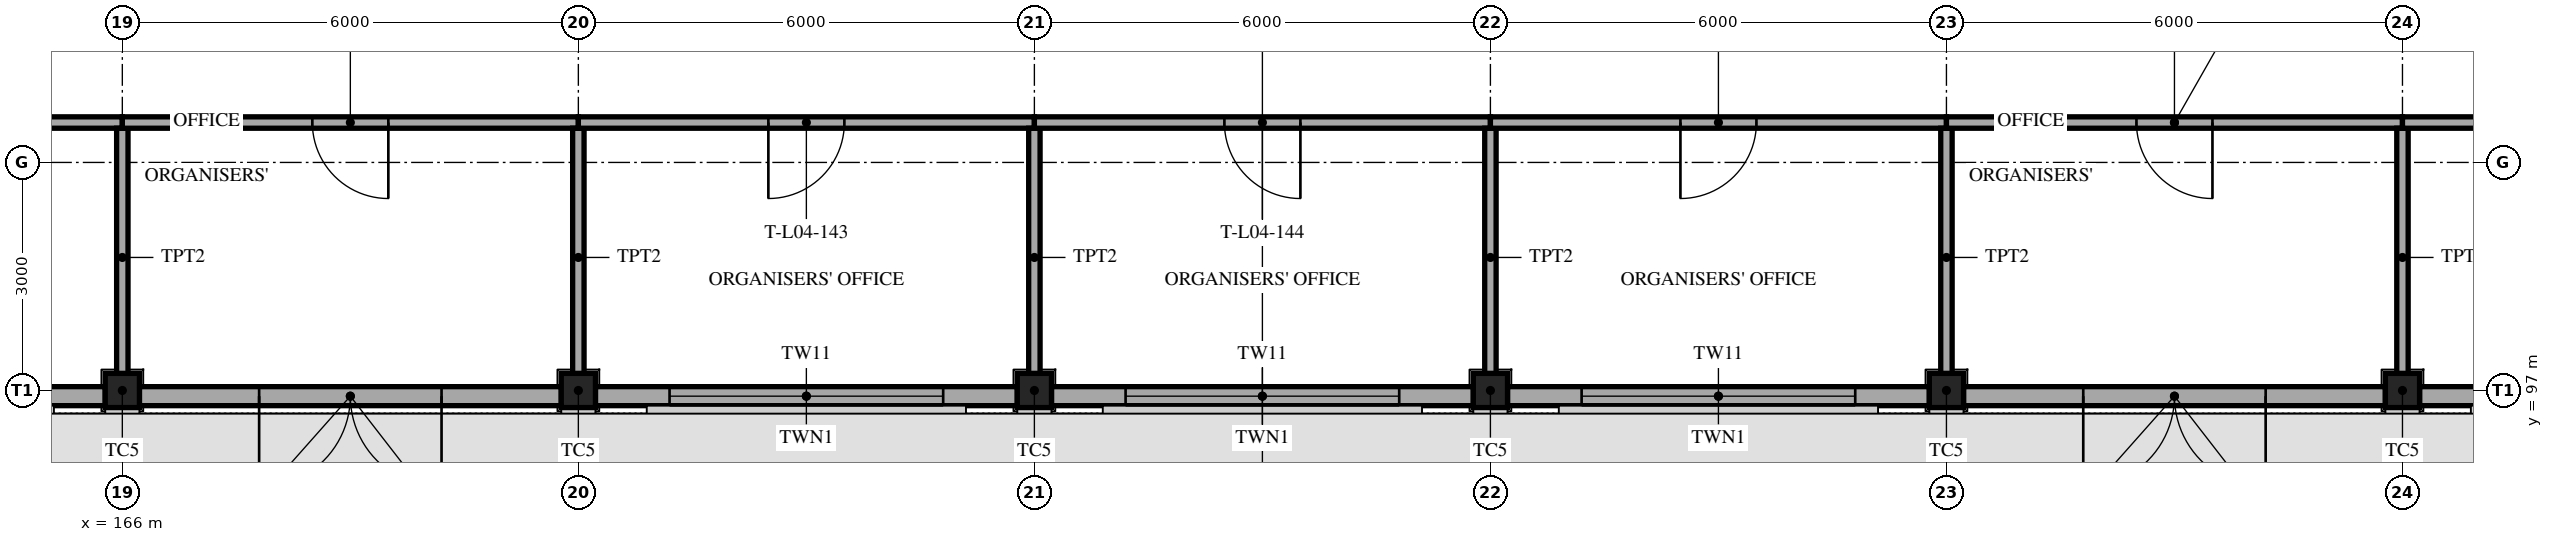
"""IFC4 building model, lengths in metres.
Left out: names, types, materials, properties, quantities, classifications, styles, units other than length and angle.
Written with IfcOpenShell. Run it as: python <this file> out.ifc"""

import sys

from ifc_helpers import new_model, si_unit, direction, frame, frame_2d, origin, origin_2d, place, context, subcontext, project, spatial, polyline, rectangle, hollow_rectangle, outline, extrude, element, fill, save


model = new_model("IFC4")
c1 = context("Model", 3, precision=1e-05, world=origin(), true_north=direction((0.0, 1.0)))
c2 = subcontext(c1, "Body", "Model", "MODEL_VIEW")
j1 = project(units=[si_unit("LENGTHUNIT", "METRE"), si_unit("PLANEANGLEUNIT", "RADIAN")], contexts=[c1])
p1 = place(None, origin())
s1 = spatial("IfcSite", under=j1, at=p1, CompositionType="ELEMENT")
p2 = place(p1, origin())
s2 = spatial("IfcBuilding", under=s1, at=p2, CompositionType="ELEMENT")
p3 = place(p2, frame((0.0, 0.0, 19.2)))
s3 = spatial("IfcBuildingStorey", under=s2, at=p3, CompositionType="ELEMENT", Elevation=19.2)
for number, where, z_axis, x_axis in (
    (1, (166.0, 97.0, 0.0), (0.0, 0.0, 1.0), (1.0, 0.0, 0.0)),
    (2, (172.0, 97.0, 0.0), (0.0, 0.0, 1.0), (1.0, 0.0, 0.0)),
    (3, (178.0, 97.0, 0.0), (0.0, 0.0, 1.0), (1.0, 0.0, 0.0)),
    (4, (184.0, 97.0, 0.0), (0.0, 0.0, 1.0), (1.0, 0.0, 0.0)),
    (5, (190.0, 97.0, 0.0), (0.0, 0.0, 1.0), (1.0, 0.0, 0.0)),
    (6, (196.0, 97.0, 0.0), (0.0, 0.0, 1.0), (1.0, 0.0, 0.0)),
):
    element("IfcColumn", number, at=place(p3, frame(where, z_axis=z_axis, x_axis=x_axis)), inside=s3, PredefinedType="COLUMN", context=c2, shape_type="SweptSolid", body=[
        extrude(hollow_rectangle(XDim=0.45, YDim=0.45, WallThickness=0.025, at=origin_2d()), origin(), (0.0, 0.0, 1.0), 4.2),
    ])
p4 = place(p3, frame((160.225, 96.925, 0.0), z_axis=(0.0, 0.0, 1.0), x_axis=(1.0, 0.0, 0.0)))
e7 = element("IfcWall", 7, at=p4, inside=s3, PredefinedType="SOLIDWALL", context=c2, shape_type="SweptSolid", body=[
    extrude(rectangle(XDim=5.55, YDim=0.25, at=frame_2d((2.775, 0.0))), origin(), (0.0, 0.0, 1.0), 3.55),
])
p5 = place(p4, frame((0.975, 0.0, 0.9)))
e8 = element("IfcOpeningElement", 8, at=p5, cuts=e7, PredefinedType="OPENING", context=c2, shape_type="SweptSolid", body=[
    extrude(rectangle(XDim=3.6, YDim=2.4, at=frame_2d((1.8, 1.2))), frame((0.0, 0.135, 0.0), z_axis=(0.0, -1.0, 0.0), x_axis=(1.0, 0.0, 0.0)), (0.0, 0.0, 1.0), 0.27),
])
p6 = place(p3, frame((172.225, 96.925, 0.0), z_axis=(0.0, 0.0, 1.0), x_axis=(1.0, 0.0, 0.0)))
e9 = element("IfcWall", 9, at=p6, inside=s3, PredefinedType="SOLIDWALL", context=c2, shape_type="SweptSolid", body=[
    extrude(rectangle(XDim=5.55, YDim=0.25, at=frame_2d((2.775, 0.0))), origin(), (0.0, 0.0, 1.0), 3.55),
])
p7 = place(p6, frame((0.975, 0.0, 0.9)))
e10 = element("IfcOpeningElement", 10, at=p7, cuts=e9, PredefinedType="OPENING", context=c2, shape_type="SweptSolid", body=[
    extrude(rectangle(XDim=3.6, YDim=2.4, at=frame_2d((1.8, 1.2))), frame((0.0, 0.135, 0.0), z_axis=(0.0, -1.0, 0.0), x_axis=(1.0, 0.0, 0.0)), (0.0, 0.0, 1.0), 0.27),
])
p8 = place(p3, frame((178.225, 96.925, 0.0), z_axis=(0.0, 0.0, 1.0), x_axis=(1.0, 0.0, 0.0)))
e11 = element("IfcWall", 11, at=p8, inside=s3, PredefinedType="SOLIDWALL", context=c2, shape_type="SweptSolid", body=[
    extrude(rectangle(XDim=5.55, YDim=0.25, at=frame_2d((2.775, 0.0))), origin(), (0.0, 0.0, 1.0), 3.55),
])
p9 = place(p8, frame((0.975, 0.0, 0.9)))
e12 = element("IfcOpeningElement", 12, at=p9, cuts=e11, PredefinedType="OPENING", context=c2, shape_type="SweptSolid", body=[
    extrude(rectangle(XDim=3.6, YDim=2.4, at=frame_2d((1.8, 1.2))), frame((0.0, 0.135, 0.0), z_axis=(0.0, -1.0, 0.0), x_axis=(1.0, 0.0, 0.0)), (0.0, 0.0, 1.0), 0.27),
])
p10 = place(p3, frame((184.225, 96.925, 0.0), z_axis=(0.0, 0.0, 1.0), x_axis=(1.0, 0.0, 0.0)))
e13 = element("IfcWall", 13, at=p10, inside=s3, PredefinedType="SOLIDWALL", context=c2, shape_type="SweptSolid", body=[
    extrude(rectangle(XDim=5.55, YDim=0.25, at=frame_2d((2.775, 0.0))), origin(), (0.0, 0.0, 1.0), 3.55),
])
p11 = place(p10, frame((0.975, 0.0, 0.9)))
e14 = element("IfcOpeningElement", 14, at=p11, cuts=e13, PredefinedType="OPENING", context=c2, shape_type="SweptSolid", body=[
    extrude(rectangle(XDim=3.6, YDim=2.4, at=frame_2d((1.8, 1.2))), frame((0.0, 0.135, 0.0), z_axis=(0.0, -1.0, 0.0), x_axis=(1.0, 0.0, 0.0)), (0.0, 0.0, 1.0), 0.27),
])
p12 = place(p3, frame((196.225, 96.925, 0.0), z_axis=(0.0, 0.0, 1.0), x_axis=(1.0, 0.0, 0.0)))
e15 = element("IfcWall", 15, at=p12, inside=s3, PredefinedType="SOLIDWALL", context=c2, shape_type="SweptSolid", body=[
    extrude(rectangle(XDim=5.55, YDim=0.25, at=frame_2d((2.775, 0.0))), origin(), (0.0, 0.0, 1.0), 3.55),
])
p13 = place(p12, frame((0.975, 0.0, 0.9)))
e16 = element("IfcOpeningElement", 16, at=p13, cuts=e15, PredefinedType="OPENING", context=c2, shape_type="SweptSolid", body=[
    extrude(rectangle(XDim=3.6, YDim=2.4, at=frame_2d((1.8, 1.2))), frame((0.0, 0.135, 0.0), z_axis=(0.0, -1.0, 0.0), x_axis=(1.0, 0.0, 0.0)), (0.0, 0.0, 1.0), 0.27),
])
p14 = place(p3, frame((166.225, 96.925, 0.0), z_axis=(0.0, 0.0, 1.0), x_axis=(1.0, 0.0, 0.0)))
e17 = element("IfcWall", 17, at=p14, inside=s3, PredefinedType="SOLIDWALL", context=c2, shape_type="SweptSolid", body=[
    extrude(rectangle(XDim=5.55, YDim=0.25, at=frame_2d((2.775, 0.0))), origin(), (0.0, 0.0, 1.0), 3.55),
])
p15 = place(p14, frame((1.575, 0.0, 0.0)))
e18 = element("IfcOpeningElement", 18, at=p15, cuts=e17, PredefinedType="OPENING", context=c2, shape_type="SweptSolid", body=[
    extrude(rectangle(XDim=2.4, YDim=2.1, at=frame_2d((1.2, 1.05))), frame((0.0, 0.135, 0.0), z_axis=(0.0, -1.0, 0.0), x_axis=(1.0, 0.0, 0.0)), (0.0, 0.0, 1.0), 0.27),
])
p16 = place(p3, frame((190.225, 96.925, 0.0), z_axis=(0.0, 0.0, 1.0), x_axis=(1.0, 0.0, 0.0)))
e19 = element("IfcWall", 19, at=p16, inside=s3, PredefinedType="SOLIDWALL", context=c2, shape_type="SweptSolid", body=[
    extrude(rectangle(XDim=5.55, YDim=0.25, at=frame_2d((2.775, 0.0))), origin(), (0.0, 0.0, 1.0), 3.55),
])
p17 = place(p16, frame((1.575, 0.0, 0.0)))
e20 = element("IfcOpeningElement", 20, at=p17, cuts=e19, PredefinedType="OPENING", context=c2, shape_type="SweptSolid", body=[
    extrude(rectangle(XDim=2.4, YDim=2.1, at=frame_2d((1.2, 1.05))), frame((0.0, 0.135, 0.0), z_axis=(0.0, -1.0, 0.0), x_axis=(1.0, 0.0, 0.0)), (0.0, 0.0, 1.0), 0.27),
])
p18 = place(p3, frame((160.05, 100.525, 0.0), z_axis=(0.0, 0.0, 1.0), x_axis=(1.0, 0.0, 0.0)))
e21 = element("IfcWall", 21, at=p18, inside=s3, PredefinedType="PARTITIONING", context=c2, shape_type="SweptSolid", body=[
    extrude(rectangle(XDim=5.95, YDim=0.15, at=frame_2d((2.975, 0.0))), origin(), (0.0, 0.0, 1.0), 3.45),
])
p19 = place(p18, frame((2.438, 0.0, 0.0)))
e22 = element("IfcOpeningElement", 22, at=p19, cuts=e21, PredefinedType="OPENING", context=c2, shape_type="SweptSolid", body=[
    extrude(rectangle(XDim=1.0, YDim=2.1, at=frame_2d((0.5, 1.05))), frame((0.0, 0.085, 0.0), z_axis=(0.0, -1.0, 0.0), x_axis=(1.0, 0.0, 0.0)), (0.0, 0.0, 1.0), 0.17),
])
p20 = place(p3, frame((166.0, 97.05, 0.0), z_axis=(0.0, 0.0, 1.0), x_axis=(0.0, 1.0, 0.0)))
e23 = element("IfcWall", 23, at=p20, inside=s3, PredefinedType="PARTITIONING", context=c2, shape_type="SweptSolid", body=[
    extrude(rectangle(XDim=3.4, YDim=0.15, at=frame_2d((1.7, 0.0))), origin(), (0.0, 0.0, 1.0), 3.45),
])
p21 = place(p3, frame((166.0, 100.525, 0.0), z_axis=(0.0, 0.0, 1.0), x_axis=(1.0, 0.0, 0.0)))
e24 = element("IfcWall", 24, at=p21, inside=s3, PredefinedType="PARTITIONING", context=c2, shape_type="SweptSolid", body=[
    extrude(rectangle(XDim=6.0, YDim=0.15, at=frame_2d((3.0, 0.0))), origin(), (0.0, 0.0, 1.0), 3.45),
])
p22 = place(p21, frame((2.5, 0.0, 0.0)))
e25 = element("IfcOpeningElement", 25, at=p22, cuts=e24, PredefinedType="OPENING", context=c2, shape_type="SweptSolid", body=[
    extrude(rectangle(XDim=1.0, YDim=2.1, at=frame_2d((0.5, 1.05))), frame((0.0, 0.085, 0.0), z_axis=(0.0, -1.0, 0.0), x_axis=(1.0, 0.0, 0.0)), (0.0, 0.0, 1.0), 0.17),
])
p23 = place(p3, frame((172.0, 97.05, 0.0), z_axis=(0.0, 0.0, 1.0), x_axis=(0.0, 1.0, 0.0)))
e26 = element("IfcWall", 26, at=p23, inside=s3, PredefinedType="PARTITIONING", context=c2, shape_type="SweptSolid", body=[
    extrude(rectangle(XDim=3.4, YDim=0.15, at=frame_2d((1.7, 0.0))), origin(), (0.0, 0.0, 1.0), 3.45),
])
p24 = place(p3, frame((172.0, 100.525, 0.0), z_axis=(0.0, 0.0, 1.0), x_axis=(1.0, 0.0, 0.0)))
e27 = element("IfcWall", 27, at=p24, inside=s3, PredefinedType="PARTITIONING", context=c2, shape_type="SweptSolid", body=[
    extrude(rectangle(XDim=6.0, YDim=0.15, at=frame_2d((3.0, 0.0))), origin(), (0.0, 0.0, 1.0), 3.45),
])
p25 = place(p24, frame((2.5, 0.0, 0.0)))
e28 = element("IfcOpeningElement", 28, at=p25, cuts=e27, PredefinedType="OPENING", context=c2, shape_type="SweptSolid", body=[
    extrude(rectangle(XDim=1.0, YDim=2.1, at=frame_2d((0.5, 1.05))), frame((0.0, 0.085, 0.0), z_axis=(0.0, -1.0, 0.0), x_axis=(1.0, 0.0, 0.0)), (0.0, 0.0, 1.0), 0.17),
])
p26 = place(p3, frame((178.0, 97.05, 0.0), z_axis=(0.0, 0.0, 1.0), x_axis=(0.0, 1.0, 0.0)))
e29 = element("IfcWall", 29, at=p26, inside=s3, PredefinedType="PARTITIONING", context=c2, shape_type="SweptSolid", body=[
    extrude(rectangle(XDim=3.4, YDim=0.15, at=frame_2d((1.7, 0.0))), origin(), (0.0, 0.0, 1.0), 3.45),
])
p27 = place(p3, frame((178.0, 100.525, 0.0), z_axis=(0.0, 0.0, 1.0), x_axis=(1.0, 0.0, 0.0)))
e30 = element("IfcWall", 30, at=p27, inside=s3, PredefinedType="PARTITIONING", context=c2, shape_type="SweptSolid", body=[
    extrude(rectangle(XDim=6.0, YDim=0.15, at=frame_2d((3.0, 0.0))), origin(), (0.0, 0.0, 1.0), 3.45),
])
p28 = place(p27, frame((2.5, 0.0, 0.0)))
e31 = element("IfcOpeningElement", 31, at=p28, cuts=e30, PredefinedType="OPENING", context=c2, shape_type="SweptSolid", body=[
    extrude(rectangle(XDim=1.0, YDim=2.1, at=frame_2d((0.5, 1.05))), frame((0.0, 0.085, 0.0), z_axis=(0.0, -1.0, 0.0), x_axis=(1.0, 0.0, 0.0)), (0.0, 0.0, 1.0), 0.17),
])
p29 = place(p3, frame((184.0, 97.05, 0.0), z_axis=(0.0, 0.0, 1.0), x_axis=(0.0, 1.0, 0.0)))
e32 = element("IfcWall", 32, at=p29, inside=s3, PredefinedType="PARTITIONING", context=c2, shape_type="SweptSolid", body=[
    extrude(rectangle(XDim=3.4, YDim=0.15, at=frame_2d((1.7, 0.0))), origin(), (0.0, 0.0, 1.0), 3.45),
])
p30 = place(p3, frame((184.0, 100.525, 0.0), z_axis=(0.0, 0.0, 1.0), x_axis=(1.0, 0.0, 0.0)))
e33 = element("IfcWall", 33, at=p30, inside=s3, PredefinedType="PARTITIONING", context=c2, shape_type="SweptSolid", body=[
    extrude(rectangle(XDim=6.0, YDim=0.15, at=frame_2d((3.0, 0.0))), origin(), (0.0, 0.0, 1.0), 3.45),
])
p31 = place(p30, frame((2.5, 0.0, 0.0)))
e34 = element("IfcOpeningElement", 34, at=p31, cuts=e33, PredefinedType="OPENING", context=c2, shape_type="SweptSolid", body=[
    extrude(rectangle(XDim=1.0, YDim=2.1, at=frame_2d((0.5, 1.05))), frame((0.0, 0.085, 0.0), z_axis=(0.0, -1.0, 0.0), x_axis=(1.0, 0.0, 0.0)), (0.0, 0.0, 1.0), 0.17),
])
p32 = place(p3, frame((190.0, 97.05, 0.0), z_axis=(0.0, 0.0, 1.0), x_axis=(0.0, 1.0, 0.0)))
e35 = element("IfcWall", 35, at=p32, inside=s3, PredefinedType="PARTITIONING", context=c2, shape_type="SweptSolid", body=[
    extrude(rectangle(XDim=3.4, YDim=0.15, at=frame_2d((1.7, 0.0))), origin(), (0.0, 0.0, 1.0), 3.45),
])
p33 = place(p3, frame((190.0, 100.525, 0.0), z_axis=(0.0, 0.0, 1.0), x_axis=(1.0, 0.0, 0.0)))
e36 = element("IfcWall", 36, at=p33, inside=s3, PredefinedType="PARTITIONING", context=c2, shape_type="SweptSolid", body=[
    extrude(rectangle(XDim=6.0, YDim=0.15, at=frame_2d((3.0, 0.0))), origin(), (0.0, 0.0, 1.0), 3.45),
])
p34 = place(p33, frame((2.5, 0.0, 0.0)))
e37 = element("IfcOpeningElement", 37, at=p34, cuts=e36, PredefinedType="OPENING", context=c2, shape_type="SweptSolid", body=[
    extrude(rectangle(XDim=1.0, YDim=2.1, at=frame_2d((0.5, 1.05))), frame((0.0, 0.085, 0.0), z_axis=(0.0, -1.0, 0.0), x_axis=(1.0, 0.0, 0.0)), (0.0, 0.0, 1.0), 0.17),
])
p35 = place(p3, frame((196.0, 97.05, 0.0), z_axis=(0.0, 0.0, 1.0), x_axis=(0.0, 1.0, 0.0)))
e38 = element("IfcWall", 38, at=p35, inside=s3, PredefinedType="PARTITIONING", context=c2, shape_type="SweptSolid", body=[
    extrude(rectangle(XDim=3.4, YDim=0.15, at=frame_2d((1.7, 0.0))), origin(), (0.0, 0.0, 1.0), 3.45),
])
p36 = place(p3, frame((196.0, 100.525, 0.0), z_axis=(0.0, 0.0, 1.0), x_axis=(1.0, 0.0, 0.0)))
e39 = element("IfcWall", 39, at=p36, inside=s3, PredefinedType="PARTITIONING", context=c2, shape_type="SweptSolid", body=[
    extrude(rectangle(XDim=5.95, YDim=0.15, at=frame_2d((2.975, 0.0))), origin(), (0.0, 0.0, 1.0), 3.45),
])
p37 = place(p36, frame((2.512, 0.0, 0.0)))
e40 = element("IfcOpeningElement", 40, at=p37, cuts=e39, PredefinedType="OPENING", context=c2, shape_type="SweptSolid", body=[
    extrude(rectangle(XDim=1.0, YDim=2.1, at=frame_2d((0.5, 1.05))), frame((0.0, 0.085, 0.0), z_axis=(0.0, -1.0, 0.0), x_axis=(1.0, 0.0, 0.0)), (0.0, 0.0, 1.0), 0.17),
])
p38 = place(p7, origin())
e41 = element("IfcWindow", 41, at=p38, inside=s3, PartitioningType="TRIPLE_PANEL_VERTICAL", PredefinedType="WINDOW", context=c2, shape_type="SweptSolid", body=[
    extrude(outline(polyline([(0.0, 0.0), (3.6, 0.0), (3.6, 2.4), (0.0, 2.4), (0.0, 0.0)]), holes=[polyline([(0.06, 0.06), (0.96, 0.06), (0.96, 2.34), (0.06, 2.34), (0.06, 0.06)]), polyline([(1.06, 0.06), (2.54, 0.06), (2.54, 2.34), (1.06, 2.34), (1.06, 0.06)]), polyline([(2.64, 0.06), (3.54, 0.06), (3.54, 2.34), (2.64, 2.34), (2.64, 0.06)])]), frame((0.0, 0.03, 0.0), z_axis=(0.0, -1.0, 0.0), x_axis=(1.0, 0.0, 0.0)), (0.0, 0.0, 1.0), 0.06),
    extrude(rectangle(XDim=0.924, YDim=2.304, at=frame_2d((0.51, 1.2))), frame((0.0, 0.01, 0.0), z_axis=(0.0, -1.0, 0.0), x_axis=(1.0, 0.0, 0.0)), (0.0, 0.0, 1.0), 0.02),
    extrude(rectangle(XDim=1.504, YDim=2.304, at=frame_2d((1.8, 1.2))), frame((0.0, 0.01, 0.0), z_axis=(0.0, -1.0, 0.0), x_axis=(1.0, 0.0, 0.0)), (0.0, 0.0, 1.0), 0.02),
    extrude(rectangle(XDim=0.924, YDim=2.304, at=frame_2d((3.09, 1.2))), frame((0.0, 0.01, 0.0), z_axis=(0.0, -1.0, 0.0), x_axis=(1.0, 0.0, 0.0)), (0.0, 0.0, 1.0), 0.02),
])
fill(e10, e41)
p39 = place(p9, origin())
e42 = element("IfcWindow", 42, at=p39, inside=s3, PartitioningType="TRIPLE_PANEL_VERTICAL", PredefinedType="WINDOW", context=c2, shape_type="SweptSolid", body=[
    extrude(outline(polyline([(0.0, 0.0), (3.6, 0.0), (3.6, 2.4), (0.0, 2.4), (0.0, 0.0)]), holes=[polyline([(0.06, 0.06), (0.96, 0.06), (0.96, 2.34), (0.06, 2.34), (0.06, 0.06)]), polyline([(1.06, 0.06), (2.54, 0.06), (2.54, 2.34), (1.06, 2.34), (1.06, 0.06)]), polyline([(2.64, 0.06), (3.54, 0.06), (3.54, 2.34), (2.64, 2.34), (2.64, 0.06)])]), frame((0.0, 0.03, 0.0), z_axis=(0.0, -1.0, 0.0), x_axis=(1.0, 0.0, 0.0)), (0.0, 0.0, 1.0), 0.06),
    extrude(rectangle(XDim=0.924, YDim=2.304, at=frame_2d((0.51, 1.2))), frame((0.0, 0.01, 0.0), z_axis=(0.0, -1.0, 0.0), x_axis=(1.0, 0.0, 0.0)), (0.0, 0.0, 1.0), 0.02),
    extrude(rectangle(XDim=1.504, YDim=2.304, at=frame_2d((1.8, 1.2))), frame((0.0, 0.01, 0.0), z_axis=(0.0, -1.0, 0.0), x_axis=(1.0, 0.0, 0.0)), (0.0, 0.0, 1.0), 0.02),
    extrude(rectangle(XDim=0.924, YDim=2.304, at=frame_2d((3.09, 1.2))), frame((0.0, 0.01, 0.0), z_axis=(0.0, -1.0, 0.0), x_axis=(1.0, 0.0, 0.0)), (0.0, 0.0, 1.0), 0.02),
])
fill(e12, e42)
p40 = place(p11, origin())
e43 = element("IfcWindow", 43, at=p40, inside=s3, PartitioningType="TRIPLE_PANEL_VERTICAL", PredefinedType="WINDOW", context=c2, shape_type="SweptSolid", body=[
    extrude(outline(polyline([(0.0, 0.0), (3.6, 0.0), (3.6, 2.4), (0.0, 2.4), (0.0, 0.0)]), holes=[polyline([(0.06, 0.06), (0.96, 0.06), (0.96, 2.34), (0.06, 2.34), (0.06, 0.06)]), polyline([(1.06, 0.06), (2.54, 0.06), (2.54, 2.34), (1.06, 2.34), (1.06, 0.06)]), polyline([(2.64, 0.06), (3.54, 0.06), (3.54, 2.34), (2.64, 2.34), (2.64, 0.06)])]), frame((0.0, 0.03, 0.0), z_axis=(0.0, -1.0, 0.0), x_axis=(1.0, 0.0, 0.0)), (0.0, 0.0, 1.0), 0.06),
    extrude(rectangle(XDim=0.924, YDim=2.304, at=frame_2d((0.51, 1.2))), frame((0.0, 0.01, 0.0), z_axis=(0.0, -1.0, 0.0), x_axis=(1.0, 0.0, 0.0)), (0.0, 0.0, 1.0), 0.02),
    extrude(rectangle(XDim=1.504, YDim=2.304, at=frame_2d((1.8, 1.2))), frame((0.0, 0.01, 0.0), z_axis=(0.0, -1.0, 0.0), x_axis=(1.0, 0.0, 0.0)), (0.0, 0.0, 1.0), 0.02),
    extrude(rectangle(XDim=0.924, YDim=2.304, at=frame_2d((3.09, 1.2))), frame((0.0, 0.01, 0.0), z_axis=(0.0, -1.0, 0.0), x_axis=(1.0, 0.0, 0.0)), (0.0, 0.0, 1.0), 0.02),
])
fill(e14, e43)
p41 = place(p15, frame((2.4, 0.0, 0.0), z_axis=(0.0, 0.0, 1.0), x_axis=(-1.0, 0.0, 0.0)))
e44 = element("IfcDoor", 44, at=p41, inside=s3, OperationType="DOUBLE_DOOR_SINGLE_SWING", PredefinedType="DOOR", context=c2, shape_type="SweptSolid", body=[
    extrude(rectangle(XDim=2.4, YDim=2.1, at=frame_2d((1.2, 1.05))), frame((0.0, 0.025, 0.0), z_axis=(0.0, -1.0, 0.0), x_axis=(1.0, 0.0, 0.0)), (0.0, 0.0, 1.0), 0.05),
])
fill(e18, e44)
p42 = place(p17, frame((2.4, 0.0, 0.0), z_axis=(0.0, 0.0, 1.0), x_axis=(-1.0, 0.0, 0.0)))
e45 = element("IfcDoor", 45, at=p42, inside=s3, OperationType="DOUBLE_DOOR_SINGLE_SWING", PredefinedType="DOOR", context=c2, shape_type="SweptSolid", body=[
    extrude(rectangle(XDim=2.4, YDim=2.1, at=frame_2d((1.2, 1.05))), frame((0.0, 0.025, 0.0), z_axis=(0.0, -1.0, 0.0), x_axis=(1.0, 0.0, 0.0)), (0.0, 0.0, 1.0), 0.05),
])
fill(e20, e45)
p43 = place(p22, frame((1.0, 0.0, 0.0), z_axis=(0.0, 0.0, 1.0), x_axis=(-1.0, 0.0, 0.0)))
e46 = element("IfcDoor", 46, at=p43, inside=s3, OperationType="SINGLE_SWING_LEFT", PredefinedType="DOOR", context=c2, shape_type="SweptSolid", body=[
    extrude(rectangle(XDim=1.0, YDim=2.1, at=frame_2d((0.5, 1.05))), frame((0.0, 0.025, 0.0), z_axis=(0.0, -1.0, 0.0), x_axis=(1.0, 0.0, 0.0)), (0.0, 0.0, 1.0), 0.05),
])
fill(e25, e46)
p44 = place(p25, frame((1.0, 0.0, 0.0), z_axis=(0.0, 0.0, 1.0), x_axis=(-1.0, 0.0, 0.0)))
e47 = element("IfcDoor", 47, at=p44, inside=s3, OperationType="SINGLE_SWING_RIGHT", PredefinedType="DOOR", context=c2, shape_type="SweptSolid", body=[
    extrude(rectangle(XDim=1.0, YDim=2.1, at=frame_2d((0.5, 1.05))), frame((0.0, 0.025, 0.0), z_axis=(0.0, -1.0, 0.0), x_axis=(1.0, 0.0, 0.0)), (0.0, 0.0, 1.0), 0.05),
])
fill(e28, e47)
p45 = place(p28, frame((1.0, 0.0, 0.0), z_axis=(0.0, 0.0, 1.0), x_axis=(-1.0, 0.0, 0.0)))
e48 = element("IfcDoor", 48, at=p45, inside=s3, OperationType="SINGLE_SWING_LEFT", PredefinedType="DOOR", context=c2, shape_type="SweptSolid", body=[
    extrude(rectangle(XDim=1.0, YDim=2.1, at=frame_2d((0.5, 1.05))), frame((0.0, 0.025, 0.0), z_axis=(0.0, -1.0, 0.0), x_axis=(1.0, 0.0, 0.0)), (0.0, 0.0, 1.0), 0.05),
])
fill(e31, e48)
p46 = place(p31, frame((1.0, 0.0, 0.0), z_axis=(0.0, 0.0, 1.0), x_axis=(-1.0, 0.0, 0.0)))
e49 = element("IfcDoor", 49, at=p46, inside=s3, OperationType="SINGLE_SWING_RIGHT", PredefinedType="DOOR", context=c2, shape_type="SweptSolid", body=[
    extrude(rectangle(XDim=1.0, YDim=2.1, at=frame_2d((0.5, 1.05))), frame((0.0, 0.025, 0.0), z_axis=(0.0, -1.0, 0.0), x_axis=(1.0, 0.0, 0.0)), (0.0, 0.0, 1.0), 0.05),
])
fill(e34, e49)
p47 = place(p34, frame((1.0, 0.0, 0.0), z_axis=(0.0, 0.0, 1.0), x_axis=(-1.0, 0.0, 0.0)))
e50 = element("IfcDoor", 50, at=p47, inside=s3, OperationType="SINGLE_SWING_LEFT", PredefinedType="DOOR", context=c2, shape_type="SweptSolid", body=[
    extrude(rectangle(XDim=1.0, YDim=2.1, at=frame_2d((0.5, 1.05))), frame((0.0, 0.025, 0.0), z_axis=(0.0, -1.0, 0.0), x_axis=(1.0, 0.0, 0.0)), (0.0, 0.0, 1.0), 0.05),
])
fill(e37, e50)
save(model, sys.argv[1])
